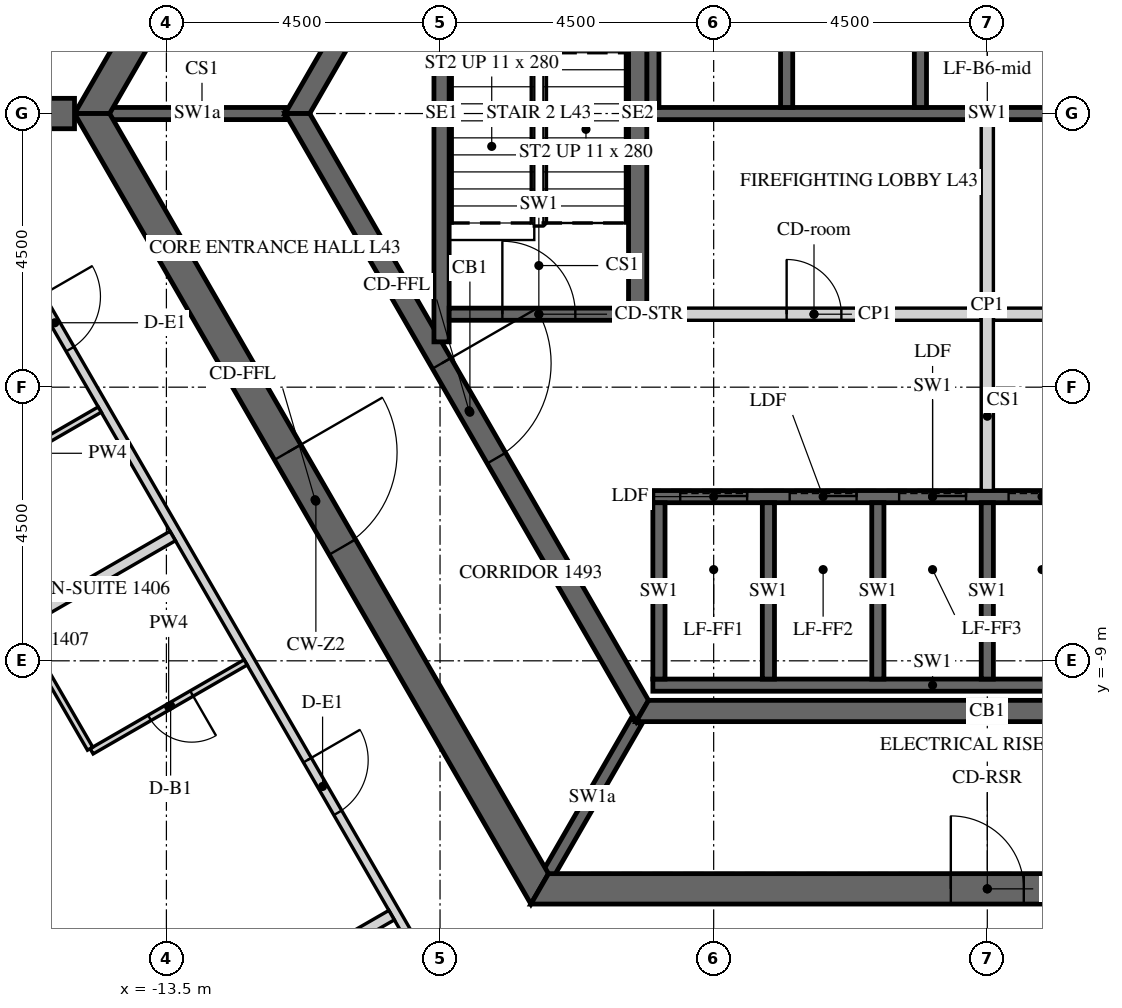
"""IFC4 building model, lengths in metres.
Left out: names, types, materials, properties, quantities, classifications, styles, units other than length and angle.
Written with IfcOpenShell. Run it as: python <this file> out.ifc"""

import sys

from ifc_helpers import new_model, si_unit, direction, frame, frame_2d, origin, place, context, subcontext, project, spatial, polyline, rectangle, outline, extrude, element, fill, save


model = new_model("IFC4")
c1 = context("Model", 3, precision=1e-05, world=origin(), true_north=direction((0.0, 1.0)))
c2 = subcontext(c1, "Body", "Model", "MODEL_VIEW")
j1 = project(units=[si_unit("LENGTHUNIT", "METRE"), si_unit("PLANEANGLEUNIT", "RADIAN")], contexts=[c1])
p1 = place(None, origin())
s1 = spatial("IfcSite", under=j1, at=p1, CompositionType="ELEMENT")
p2 = place(p1, origin())
s2 = spatial("IfcBuilding", under=s1, at=p2, CompositionType="ELEMENT")
p3 = place(p2, frame((0.0, 0.0, 183.9)))
s3 = spatial("IfcBuildingStorey", under=s2, at=p3, CompositionType="ELEMENT", Elevation=183.9)
p4 = place(p3, frame((-7.361, 12.75, -0.15), z_axis=(0.0, 0.0, 1.0), x_axis=(-0.50000571537, -0.866022103989, 0.0)))
e1 = element("IfcWall", 1, at=p4, inside=s3, PredefinedType="SHEAR", context=c2, shape_type="SweptSolid", body=[
    extrude(outline(polyline([(-0.144, -0.25), (14.867, -0.25), (14.578, 0.25), (0.144, 0.25), (-0.144, -0.25)])), origin(), (0.0, 0.0, 1.0), 3.9),
])
p5 = place(p4, frame((6.49, 0.0, 0.15)))
e2 = element("IfcOpeningElement", 2, at=p5, cuts=e1, PredefinedType="OPENING", context=c2, shape_type="SweptSolid", body=[
    extrude(rectangle(XDim=1.8, YDim=2.4, at=frame_2d((0.9, 1.2))), frame((0.0, 0.26, 0.0), z_axis=(0.0, -1.0, 0.0), x_axis=(1.0, 0.0, 0.0)), (0.0, 0.0, 1.0), 0.52),
])
p6 = place(p3, frame((-14.722, 0.0, -0.15), z_axis=(0.0, 0.0, 1.0), x_axis=(0.50000571537, -0.866022103989, 0.0)))
e3 = element("IfcWall", 3, at=p6, inside=s3, PredefinedType="SHEAR", context=c2, shape_type="SweptSolid", body=[
    extrude(outline(polyline([(-0.144, -0.25), (14.867, -0.25), (14.578, 0.25), (0.144, 0.25), (-0.144, -0.25)])), origin(), (0.0, 0.0, 1.0), 3.9),
])
p7 = place(p6, frame((6.432, 0.0, 0.15)))
e4 = element("IfcOpeningElement", 4, at=p7, cuts=e3, PredefinedType="OPENING", context=c2, shape_type="SweptSolid", body=[
    extrude(rectangle(XDim=1.8, YDim=2.4, at=frame_2d((0.9, 1.2))), frame((0.0, 0.26, 0.0), z_axis=(0.0, -1.0, 0.0), x_axis=(1.0, 0.0, 0.0)), (0.0, 0.0, 1.0), 0.52),
])
p8 = place(p3, frame((-7.361, -12.75, -0.15), z_axis=(0.0, 0.0, 1.0), x_axis=(1.0, 0.0, 0.0)))
e5 = element("IfcWall", 5, at=p8, inside=s3, PredefinedType="SHEAR", context=c2, shape_type="SweptSolid", body=[
    extrude(outline(polyline([(-0.144, -0.25), (14.866, -0.25), (14.578, 0.25), (0.144, 0.25), (-0.144, -0.25)])), origin(), (0.0, 0.0, 1.0), 3.9),
])
p9 = place(p8, frame((6.761, 0.0, 0.15)))
e6 = element("IfcOpeningElement", 6, at=p9, cuts=e5, PredefinedType="OPENING", context=c2, shape_type="SweptSolid", body=[
    extrude(rectangle(XDim=1.2, YDim=2.4, at=frame_2d((0.6, 1.2))), frame((0.0, 0.26, 0.0), z_axis=(0.0, -1.0, 0.0), x_axis=(1.0, 0.0, 0.0)), (0.0, 0.0, 1.0), 0.52),
])
p10 = place(p3, frame((-15.011, 0.0, -0.15), z_axis=(0.0, 0.0, 1.0), x_axis=(-1.0, 0.0, 0.0)))
e7 = element("IfcWall", 7, at=p10, inside=s3, PredefinedType="SHEAR", context=c2, shape_type="SweptSolid", body=[
    extrude(rectangle(XDim=15.424, YDim=0.5, at=frame_2d((7.712, 0.0))), origin(), (0.0, 0.0, 1.0), 3.9),
])
p11 = place(p10, frame((6.812, 0.0, 0.15)))
e8 = element("IfcOpeningElement", 8, at=p11, cuts=e7, PredefinedType="OPENING", context=c2, shape_type="SweptSolid", body=[
    extrude(rectangle(XDim=1.8, YDim=2.4, at=frame_2d((0.9, 1.2))), frame((0.0, 0.26, 0.0), z_axis=(0.0, -1.0, 0.0), x_axis=(1.0, 0.0, 0.0)), (0.0, 0.0, 1.0), 0.52),
])
p12 = place(p3, frame((-5.673, 9.825, -0.15), z_axis=(0.0, 0.0, 1.0), x_axis=(-0.499995046907, -0.866028263435, 0.0)))
e9 = element("IfcWall", 9, at=p12, inside=s3, PredefinedType="SHEAR", context=c2, shape_type="SweptSolid", body=[
    extrude(outline(polyline([(-0.101, -0.175), (11.446, -0.175), (11.244, 0.175), (0.101, 0.175), (-0.101, -0.175)])), origin(), (0.0, 0.0, 1.0), 3.9),
])
p13 = place(p12, frame((4.801, 0.0, 0.15)))
e10 = element("IfcOpeningElement", 10, at=p13, cuts=e9, PredefinedType="OPENING", context=c2, shape_type="SweptSolid", body=[
    extrude(rectangle(XDim=1.8, YDim=2.4, at=frame_2d((0.9, 1.2))), frame((0.0, 0.185, 0.0), z_axis=(0.0, -1.0, 0.0), x_axis=(1.0, 0.0, 0.0)), (0.0, 0.0, 1.0), 0.37),
])
p14 = place(p3, frame((-11.345, 0.0, -0.15), z_axis=(0.0, 0.0, 1.0), x_axis=(0.499995046907, -0.866028263435, 0.0)))
e11 = element("IfcWall", 11, at=p14, inside=s3, PredefinedType="SHEAR", context=c2, shape_type="SweptSolid", body=[
    extrude(outline(polyline([(-0.101, -0.175), (11.446, -0.175), (11.244, 0.175), (0.101, 0.175), (-0.101, -0.175)])), origin(), (0.0, 0.0, 1.0), 3.9),
])
p15 = place(p14, frame((4.744, 0.0, 0.15)))
e12 = element("IfcOpeningElement", 12, at=p15, cuts=e11, PredefinedType="OPENING", context=c2, shape_type="SweptSolid", body=[
    extrude(rectangle(XDim=1.8, YDim=2.4, at=frame_2d((0.9, 1.2))), frame((0.0, 0.185, 0.0), z_axis=(0.0, -1.0, 0.0), x_axis=(1.0, 0.0, 0.0)), (0.0, 0.0, 1.0), 0.37),
])
p16 = place(p3, frame((-5.673, -9.825, -0.15), z_axis=(0.0, 0.0, 1.0), x_axis=(1.0, 0.0, 0.0)))
e13 = element("IfcWall", 13, at=p16, inside=s3, PredefinedType="SHEAR", context=c2, shape_type="SweptSolid", body=[
    extrude(outline(polyline([(-0.101, -0.175), (11.446, -0.175), (11.244, 0.175), (0.101, 0.175), (-0.101, -0.175)])), origin(), (0.0, 0.0, 1.0), 3.9),
])
p17 = place(p3, frame((-5.6, 0.0, -0.25), z_axis=(0.0, 0.0, 1.0), x_axis=(1.0, 0.0, 0.0)))
e14 = element("IfcWall", 14, at=p17, inside=s3, PredefinedType="SHEAR", context=c2, shape_type="SweptSolid", body=[
    extrude(rectangle(XDim=11.2, YDim=0.2, at=frame_2d((5.6, 0.0))), origin(), (0.0, 0.0, 1.0), 3.9),
])
for number, where, z_axis, x_axis in (
    (15, (-5.5, 0.1, -0.25), (0.0, 0.0, 1.0), (0.0, 1.0, 0.0)),
    (16, (-3.3, 0.1, -0.25), (0.0, 0.0, 1.0), (0.0, 1.0, 0.0)),
    (17, (-1.1, 0.1, -0.25), (0.0, 0.0, 1.0), (0.0, 1.0, 0.0)),
):
    element("IfcWall", number, at=place(p3, frame(where, z_axis=z_axis, x_axis=x_axis)), inside=s3, PredefinedType="SHEAR", context=c2, shape_type="SweptSolid", body=[
        extrude(rectangle(XDim=3.1, YDim=0.2, at=frame_2d((1.55, 0.0))), origin(), (0.0, 0.0, 1.0), 3.9),
    ])
p18 = place(p3, frame((-5.5, -6.3, -0.25), z_axis=(0.0, 0.0, 1.0), x_axis=(1.0, 0.0, 0.0)))
e18 = element("IfcWall", 18, at=p18, inside=s3, PredefinedType="SHEAR", context=c2, shape_type="SweptSolid", body=[
    extrude(rectangle(XDim=9.2, YDim=0.2, at=frame_2d((4.6, 0.0))), origin(), (0.0, 0.0, 1.0), 3.9),
])
p19 = place(p18, frame((0.45, 0.0, 0.25)))
e19 = element("IfcOpeningElement", 19, at=p19, cuts=e18, PredefinedType="OPENING", context=c2, shape_type="SweptSolid", body=[
    extrude(rectangle(XDim=1.1, YDim=2.1, at=frame_2d((0.55, 1.05))), frame((0.0, 0.11, 0.0), z_axis=(0.0, -1.0, 0.0), x_axis=(1.0, 0.0, 0.0)), (0.0, 0.0, 1.0), 0.22),
])
p20 = place(p18, frame((2.25, 0.0, 0.25)))
e20 = element("IfcOpeningElement", 20, at=p20, cuts=e18, PredefinedType="OPENING", context=c2, shape_type="SweptSolid", body=[
    extrude(rectangle(XDim=1.1, YDim=2.1, at=frame_2d((0.55, 1.05))), frame((0.0, 0.11, 0.0), z_axis=(0.0, -1.0, 0.0), x_axis=(1.0, 0.0, 0.0)), (0.0, 0.0, 1.0), 0.22),
])
p21 = place(p18, frame((4.05, 0.0, 0.25)))
e21 = element("IfcOpeningElement", 21, at=p21, cuts=e18, PredefinedType="OPENING", context=c2, shape_type="SweptSolid", body=[
    extrude(rectangle(XDim=1.1, YDim=2.1, at=frame_2d((0.55, 1.05))), frame((0.0, 0.11, 0.0), z_axis=(0.0, -1.0, 0.0), x_axis=(1.0, 0.0, 0.0)), (0.0, 0.0, 1.0), 0.22),
])
p22 = place(p18, frame((5.85, 0.0, 0.25)))
e22 = element("IfcOpeningElement", 22, at=p22, cuts=e18, PredefinedType="OPENING", context=c2, shape_type="SweptSolid", body=[
    extrude(rectangle(XDim=1.1, YDim=2.1, at=frame_2d((0.55, 1.05))), frame((0.0, 0.11, 0.0), z_axis=(0.0, -1.0, 0.0), x_axis=(1.0, 0.0, 0.0)), (0.0, 0.0, 1.0), 0.22),
])
p23 = place(p18, frame((7.65, 0.0, 0.25)))
e23 = element("IfcOpeningElement", 23, at=p23, cuts=e18, PredefinedType="OPENING", context=c2, shape_type="SweptSolid", body=[
    extrude(rectangle(XDim=1.1, YDim=2.1, at=frame_2d((0.55, 1.05))), frame((0.0, 0.11, 0.0), z_axis=(0.0, -1.0, 0.0), x_axis=(1.0, 0.0, 0.0)), (0.0, 0.0, 1.0), 0.22),
])
p24 = place(p3, frame((-5.5, -9.4, -0.25), z_axis=(0.0, 0.0, 1.0), x_axis=(1.0, 0.0, 0.0)))
e24 = element("IfcWall", 24, at=p24, inside=s3, PredefinedType="SHEAR", context=c2, shape_type="SweptSolid", body=[
    extrude(rectangle(XDim=9.2, YDim=0.2, at=frame_2d((4.6, 0.0))), origin(), (0.0, 0.0, 1.0), 3.9),
])
for number, where, z_axis, x_axis in (
    (25, (-5.4, -9.3, -0.25), (0.0, 0.0, 1.0), (0.0, 1.0, 0.0)),
    (26, (-3.6, -9.3, -0.25), (0.0, 0.0, 1.0), (0.0, 1.0, 0.0)),
    (27, (-1.8, -9.3, -0.25), (0.0, 0.0, 1.0), (0.0, 1.0, 0.0)),
    (28, (0.0, -9.3, -0.25), (0.0, 0.0, 1.0), (0.0, 1.0, 0.0)),
):
    element("IfcWall", number, at=place(p3, frame(where, z_axis=z_axis, x_axis=x_axis)), inside=s3, PredefinedType="SHEAR", context=c2, shape_type="SweptSolid", body=[
        extrude(rectangle(XDim=2.9, YDim=0.2, at=frame_2d((1.45, 0.0))), origin(), (0.0, 0.0, 1.0), 3.9),
    ])
p25 = place(p3, frame((-5.6, -3.3, 0.0), z_axis=(0.0, 0.0, 1.0), x_axis=(1.0, 0.0, 0.0)))
e29 = element("IfcWall", 29, at=p25, inside=s3, PredefinedType="PARTITIONING", context=c2, shape_type="SweptSolid", body=[
    extrude(rectangle(XDim=5.5, YDim=0.2, at=frame_2d((2.75, 0.0))), origin(), (0.0, 0.0, 1.0), 3.65),
])
p26 = place(p25, frame((2.3, 0.0, 0.0)))
e30 = element("IfcOpeningElement", 30, at=p26, cuts=e29, PredefinedType="OPENING", context=c2, shape_type="SweptSolid", body=[
    extrude(rectangle(XDim=0.9, YDim=2.1, at=frame_2d((0.45, 1.05))), frame((0.0, 0.11, 0.0), z_axis=(0.0, -1.0, 0.0), x_axis=(1.0, 0.0, 0.0)), (0.0, 0.0, 1.0), 0.22),
])
p27 = place(p3, frame((0.1, -3.3, 0.0), z_axis=(0.0, 0.0, 1.0), x_axis=(1.0, 0.0, 0.0)))
e31 = element("IfcWall", 31, at=p27, inside=s3, PredefinedType="PARTITIONING", context=c2, shape_type="SweptSolid", body=[
    extrude(rectangle(XDim=5.5, YDim=0.2, at=frame_2d((2.75, 0.0))), origin(), (0.0, 0.0, 1.0), 3.65),
])
p28 = place(p27, frame((2.3, 0.0, 0.0)))
e32 = element("IfcOpeningElement", 32, at=p28, cuts=e31, PredefinedType="OPENING", context=c2, shape_type="SweptSolid", body=[
    extrude(rectangle(XDim=0.9, YDim=2.1, at=frame_2d((0.45, 1.05))), frame((0.0, 0.11, 0.0), z_axis=(0.0, -1.0, 0.0), x_axis=(1.0, 0.0, 0.0)), (0.0, 0.0, 1.0), 0.22),
])
p29 = place(p3, frame((0.0, -6.2, 0.0), z_axis=(0.0, 0.0, 1.0), x_axis=(0.0, 1.0, 0.0)))
e33 = element("IfcWall", 33, at=p29, inside=s3, PredefinedType="PARTITIONING", context=c2, shape_type="SweptSolid", body=[
    extrude(rectangle(XDim=6.1, YDim=0.2, at=frame_2d((3.05, 0.0))), origin(), (0.0, 0.0, 1.0), 3.65),
])
for number, where, z_axis, x_axis in (
    (34, (-11.547, 0.0, -0.15), (0.0, 0.0, 1.0), (-1.0, 0.0, 0.0)),
    (35, (-5.773, -10.0, -0.15), (0.0, 0.0, 1.0), (-0.5, -0.866, 0.0)),
):
    element("IfcWall", number, at=place(p3, frame(where, z_axis=z_axis, x_axis=x_axis)), inside=s3, PredefinedType="SHEAR", context=c2, shape_type="SweptSolid", body=[
        extrude(rectangle(XDim=2.887, YDim=0.2, at=frame_2d((1.443, 0.0))), origin(), (0.0, 0.0, 1.0), 3.9),
    ])
p30 = place(p3, frame((-5.75, -3.4, -0.25), z_axis=(0.0, 0.0, 1.0), x_axis=(0.0, 1.0, 0.0)))
e36 = element("IfcWall", 36, at=p30, inside=s3, PredefinedType="SHEAR", context=c2, shape_type="SweptSolid", body=[
    extrude(rectangle(XDim=6.8, YDim=0.3, at=frame_2d((3.4, 0.0))), origin(), (0.0, 0.0, 1.0), 3.9),
])
p31 = place(p3, frame((-8.975, -3.755, -0.25), z_axis=(0.0, 0.0, 1.0), x_axis=(0.0, 1.0, 0.0)))
e37 = element("IfcWall", 37, at=p31, inside=s3, PredefinedType="SHEAR", context=c2, shape_type="SweptSolid", body=[
    extrude(rectangle(XDim=7.51, YDim=0.25, at=frame_2d((3.755, 0.0))), origin(), (0.0, 0.0, 1.0), 3.9),
])
p32 = place(p3, frame((-8.85, -3.3, -0.25), z_axis=(0.0, 0.0, 1.0), x_axis=(1.0, 0.0, 0.0)))
e38 = element("IfcWall", 38, at=p32, inside=s3, PredefinedType="SHEAR", context=c2, shape_type="SweptSolid", body=[
    extrude(rectangle(XDim=2.95, YDim=0.2, at=frame_2d((1.475, 0.0))), origin(), (0.0, 0.0, 1.0), 3.9),
])
p33 = place(p32, frame((0.875, 0.0, 0.25)))
e39 = element("IfcOpeningElement", 39, at=p33, cuts=e38, PredefinedType="OPENING", context=c2, shape_type="SweptSolid", body=[
    extrude(rectangle(XDim=1.2, YDim=2.4, at=frame_2d((0.6, 1.2))), frame((0.0, 0.11, 0.0), z_axis=(0.0, -1.0, 0.0), x_axis=(1.0, 0.0, 0.0)), (0.0, 0.0, 1.0), 0.22),
])
p34 = place(p3, frame((-16.094, -2.125, 0.0), z_axis=(0.0, 0.0, 1.0), x_axis=(0.500010545262, -0.866019315389, 0.0)))
e40 = element("IfcWall", 40, at=p34, inside=s3, PredefinedType="PARTITIONING", context=c2, shape_type="SweptSolid", body=[
    extrude(rectangle(XDim=14.867, YDim=0.15, at=frame_2d((7.434, 0.0))), origin(), (0.0, 0.0, 1.0), 2.988),
])
p35 = place(p34, frame((1.019, 0.0, 0.0)))
e41 = element("IfcOpeningElement", 41, at=p35, cuts=e40, PredefinedType="OPENING", context=c2, shape_type="SweptSolid", body=[
    extrude(rectangle(XDim=1.0, YDim=2.1, at=frame_2d((0.5, 1.05))), frame((0.0, 0.085, 0.0), z_axis=(0.0, -1.0, 0.0), x_axis=(1.0, 0.0, 0.0)), (0.0, 0.0, 1.0), 0.17),
])
p36 = place(p34, frame((9.824, 0.0, 0.0)))
e42 = element("IfcOpeningElement", 42, at=p36, cuts=e40, PredefinedType="OPENING", context=c2, shape_type="SweptSolid", body=[
    extrude(rectangle(XDim=1.0, YDim=2.1, at=frame_2d((0.5, 1.05))), frame((0.0, 0.085, 0.0), z_axis=(0.0, -1.0, 0.0), x_axis=(1.0, 0.0, 0.0)), (0.0, 0.0, 1.0), 0.17),
])
p37 = place(p34, frame((13.717, 0.0, 0.0)))
e43 = element("IfcOpeningElement", 43, at=p37, cuts=e40, PredefinedType="OPENING", context=c2, shape_type="SweptSolid", body=[
    extrude(rectangle(XDim=1.0, YDim=2.1, at=frame_2d((0.5, 1.05))), frame((0.0, 0.085, 0.0), z_axis=(0.0, -1.0, 0.0), x_axis=(1.0, 0.0, 0.0)), (0.0, 0.0, 1.0), 0.17),
])
p38 = place(p3, frame((-17.086, -6.306, 0.0), z_axis=(0.0, 0.0, 1.0), x_axis=(0.866018712932, 0.500011588718, 0.0)))
e44 = element("IfcWall", 44, at=p38, inside=s3, PredefinedType="PARTITIONING", context=c2, shape_type="SweptSolid", body=[
    extrude(rectangle(XDim=2.875, YDim=0.1, at=frame_2d((1.438, 0.0))), origin(), (0.0, 0.0, 1.0), 2.988),
])
p39 = place(p38, frame((1.05, 0.0, 0.0)))
e45 = element("IfcOpeningElement", 45, at=p39, cuts=e44, PredefinedType="OPENING", context=c2, shape_type="SweptSolid", body=[
    extrude(rectangle(XDim=0.8, YDim=2.1, at=frame_2d((0.4, 1.05))), frame((0.0, 0.06, 0.0), z_axis=(0.0, -1.0, 0.0), x_axis=(1.0, 0.0, 0.0)), (0.0, 0.0, 1.0), 0.12),
])
p40 = place(p3, frame((-24.114, -13.134, 0.0), z_axis=(0.0, 0.0, 1.0), x_axis=(0.866024931941, 0.500000817256, 0.0)))
e46 = element("IfcWall", 46, at=p40, inside=s3, PredefinedType="PARTITIONING", context=c2, shape_type="SweptSolid", body=[
    extrude(rectangle(XDim=12.375, YDim=0.18, at=frame_2d((6.188, 0.0))), origin(), (0.0, 0.0, 1.0), 2.988),
])
p41 = place(p3, frame((-12.196, -9.025, 0.0), z_axis=(0.0, 0.0, 1.0), x_axis=(-0.86601045545, -0.500025890382, 0.0)))
e47 = element("IfcWall", 47, at=p41, inside=s3, PredefinedType="PARTITIONING", context=c2, shape_type="SweptSolid", body=[
    extrude(rectangle(XDim=2.925, YDim=0.1, at=frame_2d((1.462, 0.0))), origin(), (0.0, 0.0, 1.0), 2.988),
])
p42 = place(p41, frame((1.025, 0.0, 0.0)))
e48 = element("IfcOpeningElement", 48, at=p42, cuts=e47, PredefinedType="OPENING", context=c2, shape_type="SweptSolid", body=[
    extrude(rectangle(XDim=0.8, YDim=2.1, at=frame_2d((0.4, 1.05))), frame((0.0, 0.06, 0.0), z_axis=(0.0, -1.0, 0.0), x_axis=(1.0, 0.0, 0.0)), (0.0, 0.0, 1.0), 0.12),
])
p43 = place(p3, frame((-14.755, -10.444, 0.0), z_axis=(0.0, 0.0, 1.0), x_axis=(-0.4999967785, 0.866027263711, 0.0)))
e49 = element("IfcWall", 49, at=p43, inside=s3, PredefinedType="PARTITIONING", context=c2, shape_type="SweptSolid", body=[
    extrude(rectangle(XDim=2.26, YDim=0.1, at=frame_2d((1.13, 0.0))), origin(), (0.0, 0.0, 1.0), 2.988),
])
p44 = place(p3, frame((-20.513, -19.37, 0.0), z_axis=(0.0, 0.0, 1.0), x_axis=(0.866024931941, 0.500000817256, 0.0)))
e50 = element("IfcWall", 50, at=p44, inside=s3, PredefinedType="PARTITIONING", context=c2, shape_type="SweptSolid", body=[
    extrude(rectangle(XDim=12.375, YDim=0.18, at=frame_2d((6.188, 0.0))), origin(), (0.0, 0.0, 1.0), 2.988),
])
p45 = place(p7, origin())
e51 = element("IfcDoor", 51, at=p45, inside=s3, OperationType="DOUBLE_DOOR_SINGLE_SWING", PredefinedType="DOOR", context=c2, shape_type="SweptSolid", body=[
    extrude(rectangle(XDim=1.8, YDim=2.4, at=frame_2d((0.9, 1.2))), frame((0.0, 0.025, 0.0), z_axis=(0.0, -1.0, 0.0), x_axis=(1.0, 0.0, 0.0)), (0.0, 0.0, 1.0), 0.05),
])
fill(e4, e51)
p46 = place(p9, origin())
e52 = element("IfcDoor", 52, at=p46, inside=s3, OperationType="SINGLE_SWING_LEFT", PredefinedType="DOOR", context=c2, shape_type="SweptSolid", body=[
    extrude(rectangle(XDim=1.2, YDim=2.4, at=frame_2d((0.6, 1.2))), frame((0.0, 0.025, 0.0), z_axis=(0.0, -1.0, 0.0), x_axis=(1.0, 0.0, 0.0)), (0.0, 0.0, 1.0), 0.05),
])
fill(e6, e52)
p47 = place(p15, origin())
e53 = element("IfcDoor", 53, at=p47, inside=s3, OperationType="DOUBLE_DOOR_SINGLE_SWING", PredefinedType="DOOR", context=c2, shape_type="SweptSolid", body=[
    extrude(rectangle(XDim=1.8, YDim=2.4, at=frame_2d((0.9, 1.2))), frame((0.0, 0.025, 0.0), z_axis=(0.0, -1.0, 0.0), x_axis=(1.0, 0.0, 0.0)), (0.0, 0.0, 1.0), 0.05),
])
fill(e12, e53)
p48 = place(p26, origin())
e54 = element("IfcDoor", 54, at=p48, inside=s3, OperationType="SINGLE_SWING_LEFT", PredefinedType="DOOR", context=c2, shape_type="SweptSolid", body=[
    extrude(rectangle(XDim=0.9, YDim=2.1, at=frame_2d((0.45, 1.05))), frame((0.0, 0.025, 0.0), z_axis=(0.0, -1.0, 0.0), x_axis=(1.0, 0.0, 0.0)), (0.0, 0.0, 1.0), 0.05),
])
fill(e30, e54)
p49 = place(p33, origin())
e55 = element("IfcDoor", 55, at=p49, inside=s3, OperationType="SINGLE_SWING_LEFT", PredefinedType="DOOR", context=c2, shape_type="SweptSolid", body=[
    extrude(rectangle(XDim=1.2, YDim=2.4, at=frame_2d((0.6, 1.2))), frame((0.0, 0.025, 0.0), z_axis=(0.0, -1.0, 0.0), x_axis=(1.0, 0.0, 0.0)), (0.0, 0.0, 1.0), 0.05),
])
fill(e39, e55)
p50 = place(p19, origin())
e56 = element("IfcDoor", 56, at=p50, inside=s3, OperationType="SLIDING_TO_LEFT", PredefinedType="DOOR", context=c2, shape_type="SweptSolid", body=[
    extrude(rectangle(XDim=1.1, YDim=2.1, at=frame_2d((0.55, 1.05))), frame((0.0, 0.025, 0.0), z_axis=(0.0, -1.0, 0.0), x_axis=(1.0, 0.0, 0.0)), (0.0, 0.0, 1.0), 0.05),
])
fill(e19, e56)
p51 = place(p20, origin())
e57 = element("IfcDoor", 57, at=p51, inside=s3, OperationType="SLIDING_TO_LEFT", PredefinedType="DOOR", context=c2, shape_type="SweptSolid", body=[
    extrude(rectangle(XDim=1.1, YDim=2.1, at=frame_2d((0.55, 1.05))), frame((0.0, 0.025, 0.0), z_axis=(0.0, -1.0, 0.0), x_axis=(1.0, 0.0, 0.0)), (0.0, 0.0, 1.0), 0.05),
])
fill(e20, e57)
p52 = place(p21, origin())
e58 = element("IfcDoor", 58, at=p52, inside=s3, OperationType="SLIDING_TO_LEFT", PredefinedType="DOOR", context=c2, shape_type="SweptSolid", body=[
    extrude(rectangle(XDim=1.1, YDim=2.1, at=frame_2d((0.55, 1.05))), frame((0.0, 0.025, 0.0), z_axis=(0.0, -1.0, 0.0), x_axis=(1.0, 0.0, 0.0)), (0.0, 0.0, 1.0), 0.05),
])
fill(e21, e58)
p53 = place(p22, origin())
e59 = element("IfcDoor", 59, at=p53, inside=s3, OperationType="SLIDING_TO_LEFT", PredefinedType="DOOR", context=c2, shape_type="SweptSolid", body=[
    extrude(rectangle(XDim=1.1, YDim=2.1, at=frame_2d((0.55, 1.05))), frame((0.0, 0.025, 0.0), z_axis=(0.0, -1.0, 0.0), x_axis=(1.0, 0.0, 0.0)), (0.0, 0.0, 1.0), 0.05),
])
fill(e22, e59)
p54 = place(p35, origin())
e60 = element("IfcDoor", 60, at=p54, inside=s3, OperationType="SINGLE_SWING_RIGHT", PredefinedType="DOOR", context=c2, shape_type="SweptSolid", body=[
    extrude(rectangle(XDim=1.0, YDim=2.1, at=frame_2d((0.5, 1.05))), frame((0.0, 0.025, 0.0), z_axis=(0.0, -1.0, 0.0), x_axis=(1.0, 0.0, 0.0)), (0.0, 0.0, 1.0), 0.05),
])
fill(e41, e60)
p55 = place(p36, origin())
e61 = element("IfcDoor", 61, at=p55, inside=s3, OperationType="SINGLE_SWING_RIGHT", PredefinedType="DOOR", context=c2, shape_type="SweptSolid", body=[
    extrude(rectangle(XDim=1.0, YDim=2.1, at=frame_2d((0.5, 1.05))), frame((0.0, 0.025, 0.0), z_axis=(0.0, -1.0, 0.0), x_axis=(1.0, 0.0, 0.0)), (0.0, 0.0, 1.0), 0.05),
])
fill(e42, e61)
p56 = place(p42, origin())
e62 = element("IfcDoor", 62, at=p56, inside=s3, OperationType="SINGLE_SWING_RIGHT", PredefinedType="DOOR", context=c2, shape_type="SweptSolid", body=[
    extrude(rectangle(XDim=0.8, YDim=2.1, at=frame_2d((0.4, 1.05))), frame((0.0, 0.025, 0.0), z_axis=(0.0, -1.0, 0.0), x_axis=(1.0, 0.0, 0.0)), (0.0, 0.0, 1.0), 0.05),
])
fill(e48, e62)
save(model, sys.argv[1])
